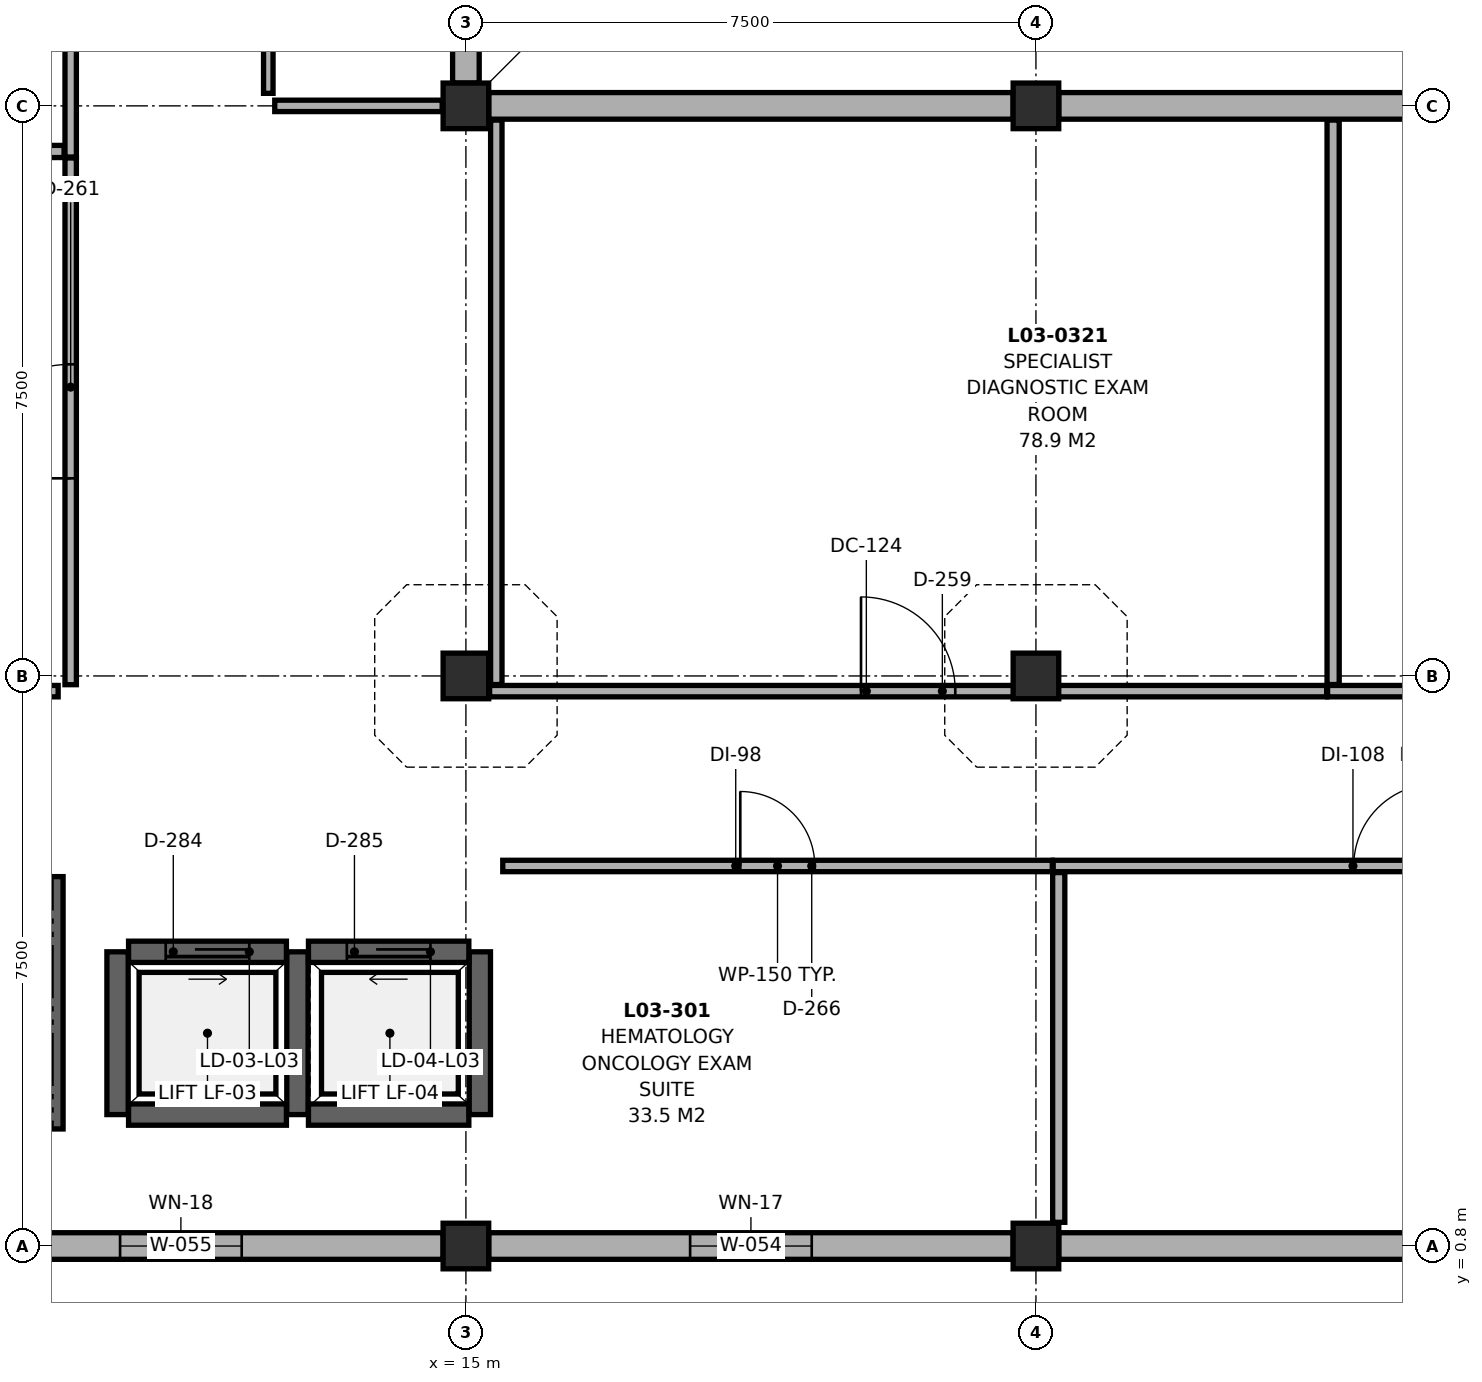
"""IFC4 building model, lengths in metres.
Left out: names, types, materials, properties, quantities, classifications, styles, units other than length and angle.
Written with IfcOpenShell. Run it as: python <this file> out.ifc"""

import sys

from ifc_helpers import new_model, si_unit, direction, frame, frame_2d, origin, origin_2d, place, context, subcontext, project, spatial, rectangle, extrude, element, fill, save


model = new_model("IFC4")
c1 = context("Model", 3, precision=1e-05, world=origin(), true_north=direction((0.0, 1.0)))
c2 = subcontext(c1, "Body", "Model", "MODEL_VIEW")
j1 = project(units=[si_unit("LENGTHUNIT", "METRE"), si_unit("PLANEANGLEUNIT", "RADIAN")], contexts=[c1])
p1 = place(None, origin())
s1 = spatial("IfcSite", under=j1, at=p1, CompositionType="ELEMENT")
p2 = place(p1, origin())
s2 = spatial("IfcBuilding", under=s1, at=p2, CompositionType="ELEMENT")
p3 = place(p2, frame((0.0, 0.0, 13.5)))
s3 = spatial("IfcBuildingStorey", under=s2, at=p3, CompositionType="ELEMENT", Elevation=13.5)
for number, where, z_axis, x_axis in (
    (1, (15.0, 0.8, 0.0), (0.0, 0.0, 1.0), (1.0, 0.0, 0.0)),
    (2, (15.0, 8.3, 0.0), (0.0, 0.0, 1.0), (1.0, 0.0, 0.0)),
    (3, (15.0, 15.8, 0.0), (0.0, 0.0, 1.0), (1.0, 0.0, 0.0)),
    (4, (22.5, 0.8, 0.0), (0.0, 0.0, 1.0), (1.0, 0.0, 0.0)),
    (5, (22.5, 8.3, 0.0), (0.0, 0.0, 1.0), (1.0, 0.0, 0.0)),
    (6, (22.5, 15.8, 0.0), (0.0, 0.0, 1.0), (1.0, 0.0, 0.0)),
):
    element("IfcColumn", number, at=place(p3, frame(where, z_axis=z_axis, x_axis=x_axis)), inside=s3, PredefinedType="COLUMN", context=c2, shape_type="SweptSolid", body=[
        extrude(rectangle(XDim=0.6, YDim=0.6, at=origin_2d()), origin(), (0.0, 0.0, 1.0), 3.72),
    ])
p4 = place(p3, frame((29.7, 0.8, 0.0), z_axis=(0.0, 0.0, 1.0), x_axis=(-1.0, 0.0, 0.0)))
e7 = element("IfcWall", 7, at=p4, inside=s3, PredefinedType="SOLIDWALL", context=c2, shape_type="SweptSolid", body=[
    extrude(rectangle(XDim=6.9, YDim=0.35, at=frame_2d((3.45, 0.0))), origin(), (0.0, 0.0, 1.0), 2.805),
])
p5 = place(p3, frame((22.2, 0.8, 0.0), z_axis=(0.0, 0.0, 1.0), x_axis=(-1.0, 0.0, 0.0)))
e8 = element("IfcWall", 8, at=p5, inside=s3, PredefinedType="SOLIDWALL", context=c2, shape_type="SweptSolid", body=[
    extrude(rectangle(XDim=6.9, YDim=0.35, at=frame_2d((3.45, 0.0))), origin(), (0.0, 0.0, 1.0), 2.805),
])
p6 = place(p5, frame((2.65, 0.0, 0.9)))
e9 = element("IfcOpeningElement", 9, at=p6, cuts=e8, PredefinedType="OPENING", context=c2, shape_type="SweptSolid", body=[
    extrude(rectangle(XDim=1.6, YDim=1.3, at=frame_2d((0.8, 0.65))), frame((0.0, 0.187, 0.0), z_axis=(0.0, -1.0, 0.0), x_axis=(1.0, 0.0, 0.0)), (0.0, 0.0, 1.0), 0.374),
])
p7 = place(p3, frame((14.7, 0.8, 0.0), z_axis=(0.0, 0.0, 1.0), x_axis=(-1.0, 0.0, 0.0)))
e10 = element("IfcWall", 10, at=p7, inside=s3, PredefinedType="SOLIDWALL", context=c2, shape_type="SweptSolid", body=[
    extrude(rectangle(XDim=6.9, YDim=0.35, at=frame_2d((3.45, 0.0))), origin(), (0.0, 0.0, 1.0), 3.055),
])
p8 = place(p7, frame((2.65, 0.0, 0.9)))
e11 = element("IfcOpeningElement", 11, at=p8, cuts=e10, PredefinedType="OPENING", context=c2, shape_type="SweptSolid", body=[
    extrude(rectangle(XDim=1.6, YDim=1.5, at=frame_2d((0.8, 0.75))), frame((0.0, 0.187, 0.0), z_axis=(0.0, -1.0, 0.0), x_axis=(1.0, 0.0, 0.0)), (0.0, 0.0, 1.0), 0.374),
])
for number, where, z_axis, x_axis in (
    (12, (15.3, 15.8, 0.0), (0.0, 0.0, 1.0), (1.0, 0.0, 0.0)),
    (13, (22.8, 15.8, 0.0), (0.0, 0.0, 1.0), (1.0, 0.0, 0.0)),
    (14, (15.0, 23.0, 0.0), (0.0, 0.0, 1.0), (0.0, -1.0, 0.0)),
):
    element("IfcWall", number, at=place(p3, frame(where, z_axis=z_axis, x_axis=x_axis)), inside=s3, PredefinedType="SOLIDWALL", context=c2, shape_type="SweptSolid", body=[
        extrude(rectangle(XDim=6.9, YDim=0.35, at=frame_2d((3.45, 0.0))), origin(), (0.0, 0.0, 1.0), 2.805),
    ])
p9 = place(p3, frame((9.56, 2.34, 0.0), z_axis=(0.0, 0.0, 1.0), x_axis=(0.0, 1.0, 0.0)))
e15 = element("IfcWall", 15, at=p9, inside=s3, PredefinedType="SHEAR", context=c2, shape_type="SweptSolid", body=[
    extrude(rectangle(XDim=3.32, YDim=0.28, at=frame_2d((1.66, 0.0))), origin(), (0.0, 0.0, 1.0), 3.72),
])
p10 = place(p3, frame((10.562, 2.529, 0.0), z_axis=(0.0, 0.0, 1.0), x_axis=(1.0, 0.0, 0.0)))
e16 = element("IfcWall", 16, at=p10, inside=s3, PredefinedType="SHEAR", context=c2, shape_type="SweptSolid", body=[
    extrude(rectangle(XDim=2.077, YDim=0.28, at=frame_2d((1.039, 0.0))), origin(), (0.0, 0.0, 1.0), 3.72),
])
p11 = place(p3, frame((12.783, 2.529, 0.0), z_axis=(0.0, 0.0, 1.0), x_axis=(0.0, 1.0, 0.0)))
e17 = element("IfcWall", 17, at=p11, inside=s3, PredefinedType="SHEAR", context=c2, shape_type="SweptSolid", body=[
    extrude(rectangle(XDim=2.141, YDim=0.28, at=frame_2d((1.071, 0.0))), origin(), (0.0, 0.0, 1.0), 3.72),
])
p12 = place(p3, frame((12.638, 4.671, 0.0), z_axis=(0.0, 0.0, 1.0), x_axis=(-1.0, 0.0, 0.0)))
e18 = element("IfcWall", 18, at=p12, inside=s3, PredefinedType="SHEAR", context=c2, shape_type="SweptSolid", body=[
    extrude(rectangle(XDim=2.077, YDim=0.28, at=frame_2d((1.039, 0.0))), origin(), (0.0, 0.0, 1.0), 3.72),
])
p13 = place(p12, frame((0.489, 0.0, 0.0)))
e19 = element("IfcOpeningElement", 19, at=p13, cuts=e18, PredefinedType="OPENING", context=c2, shape_type="SweptSolid", body=[
    extrude(rectangle(XDim=1.1, YDim=2.15, at=frame_2d((0.55, 1.075))), frame((0.0, 0.152, 0.0), z_axis=(0.0, -1.0, 0.0), x_axis=(1.0, 0.0, 0.0)), (0.0, 0.0, 1.0), 0.304),
])
p14 = place(p3, frame((10.417, 4.671, 0.0), z_axis=(0.0, 0.0, 1.0), x_axis=(0.0, -1.0, 0.0)))
e20 = element("IfcWall", 20, at=p14, inside=s3, PredefinedType="SHEAR", context=c2, shape_type="SweptSolid", body=[
    extrude(rectangle(XDim=2.141, YDim=0.28, at=frame_2d((1.071, 0.0))), origin(), (0.0, 0.0, 1.0), 3.72),
])
p15 = place(p3, frame((12.928, 2.529, 0.0), z_axis=(0.0, 0.0, 1.0), x_axis=(1.0, 0.0, 0.0)))
e21 = element("IfcWall", 21, at=p15, inside=s3, PredefinedType="SHEAR", context=c2, shape_type="SweptSolid", body=[
    extrude(rectangle(XDim=2.11, YDim=0.28, at=frame_2d((1.055, 0.0))), origin(), (0.0, 0.0, 1.0), 3.72),
])
p16 = place(p3, frame((15.184, 2.529, 0.0), z_axis=(0.0, 0.0, 1.0), x_axis=(0.0, 1.0, 0.0)))
e22 = element("IfcWall", 22, at=p16, inside=s3, PredefinedType="SHEAR", context=c2, shape_type="SweptSolid", body=[
    extrude(rectangle(XDim=2.141, YDim=0.28, at=frame_2d((1.071, 0.0))), origin(), (0.0, 0.0, 1.0), 3.72),
])
p17 = place(p3, frame((15.039, 4.671, 0.0), z_axis=(0.0, 0.0, 1.0), x_axis=(-1.0, 0.0, 0.0)))
e23 = element("IfcWall", 23, at=p17, inside=s3, PredefinedType="SHEAR", context=c2, shape_type="SweptSolid", body=[
    extrude(rectangle(XDim=2.11, YDim=0.28, at=frame_2d((1.055, 0.0))), origin(), (0.0, 0.0, 1.0), 3.72),
])
p18 = place(p17, frame((0.505, 0.0, 0.0)))
e24 = element("IfcOpeningElement", 24, at=p18, cuts=e23, PredefinedType="OPENING", context=c2, shape_type="SweptSolid", body=[
    extrude(rectangle(XDim=1.1, YDim=2.15, at=frame_2d((0.55, 1.075))), frame((0.0, 0.152, 0.0), z_axis=(0.0, -1.0, 0.0), x_axis=(1.0, 0.0, 0.0)), (0.0, 0.0, 1.0), 0.304),
])
p19 = place(p3, frame((15.485, 5.8, 0.0), z_axis=(0.0, 0.0, 1.0), x_axis=(1.0, 0.0, 0.0)))
e25 = element("IfcWall", 25, at=p19, inside=s3, PredefinedType="PARTITIONING", context=c2, shape_type="SweptSolid", body=[
    extrude(rectangle(XDim=7.23, YDim=0.15, at=frame_2d((3.615, 0.0))), origin(), (0.0, 0.0, 1.0), 2.805),
])
p20 = place(p19, frame((3.125, 0.0, 0.0)))
e26 = element("IfcOpeningElement", 26, at=p20, cuts=e25, PredefinedType="OPENING", context=c2, shape_type="SweptSolid", body=[
    extrude(rectangle(XDim=0.98, YDim=2.12, at=frame_2d((0.49, 1.06))), frame((0.0, 0.087, 0.0), z_axis=(0.0, -1.0, 0.0), x_axis=(1.0, 0.0, 0.0)), (0.0, 0.0, 1.0), 0.174),
])
p21 = place(p3, frame((22.727, 5.8, 0.0), z_axis=(0.0, 0.0, 1.0), x_axis=(1.0, 0.0, 0.0)))
e27 = element("IfcWall", 27, at=p21, inside=s3, PredefinedType="PARTITIONING", context=c2, shape_type="SweptSolid", body=[
    extrude(rectangle(XDim=8.988, YDim=0.15, at=frame_2d((4.494, 0.0))), origin(), (0.0, 0.0, 1.0), 2.805),
])
p22 = place(p21, frame((3.954, 0.0, 0.0)))
e28 = element("IfcOpeningElement", 28, at=p22, cuts=e27, PredefinedType="OPENING", context=c2, shape_type="SweptSolid", body=[
    extrude(rectangle(XDim=1.08, YDim=2.18, at=frame_2d((0.54, 1.09))), frame((0.0, 0.087, 0.0), z_axis=(0.0, -1.0, 0.0), x_axis=(1.0, 0.0, 0.0)), (0.0, 0.0, 1.0), 0.174),
])
p23 = place(p3, frame((15.312, 8.1, 0.0), z_axis=(0.0, 0.0, 1.0), x_axis=(1.0, 0.0, 0.0)))
e29 = element("IfcWall", 29, at=p23, inside=s3, PredefinedType="PARTITIONING", context=c2, shape_type="SweptSolid", body=[
    extrude(rectangle(XDim=11.013, YDim=0.15, at=frame_2d((5.506, 0.0))), origin(), (0.0, 0.0, 1.0), 2.805),
])
p24 = place(p23, frame((4.886, 0.0, 0.0)))
e30 = element("IfcOpeningElement", 30, at=p24, cuts=e29, PredefinedType="OPENING", context=c2, shape_type="SweptSolid", body=[
    extrude(rectangle(XDim=1.24, YDim=2.2, at=frame_2d((0.62, 1.1))), frame((0.0, 0.087, 0.0), z_axis=(0.0, -1.0, 0.0), x_axis=(1.0, 0.0, 0.0)), (0.0, 0.0, 1.0), 0.174),
])
p25 = place(p3, frame((26.337, 8.1, 0.0), z_axis=(0.0, 0.0, 1.0), x_axis=(1.0, 0.0, 0.0)))
e31 = element("IfcWall", 31, at=p25, inside=s3, PredefinedType="PARTITIONING", context=c2, shape_type="SweptSolid", body=[
    extrude(rectangle(XDim=10.876, YDim=0.15, at=frame_2d((5.438, 0.0))), origin(), (0.0, 0.0, 1.0), 2.805),
])
p26 = place(p25, frame((4.798, 0.0, 0.0)))
e32 = element("IfcOpeningElement", 32, at=p26, cuts=e31, PredefinedType="OPENING", context=c2, shape_type="SweptSolid", body=[
    extrude(rectangle(XDim=1.28, YDim=2.22, at=frame_2d((0.64, 1.11))), frame((0.0, 0.087, 0.0), z_axis=(0.0, -1.0, 0.0), x_axis=(1.0, 0.0, 0.0)), (0.0, 0.0, 1.0), 0.174),
])
p27 = place(p3, frame((9.8, 8.185, 0.0), z_axis=(0.0, 0.0, 1.0), x_axis=(0.0, 1.0, 0.0)))
e33 = element("IfcWall", 33, at=p27, inside=s3, PredefinedType="PARTITIONING", context=c2, shape_type="SweptSolid", body=[
    extrude(rectangle(XDim=6.93, YDim=0.15, at=frame_2d((3.465, 0.0))), origin(), (0.0, 0.0, 1.0), 2.805),
])
p28 = place(p27, frame((2.715, 0.0, 0.0)))
e34 = element("IfcOpeningElement", 34, at=p28, cuts=e33, PredefinedType="OPENING", context=c2, shape_type="SweptSolid", body=[
    extrude(rectangle(XDim=1.5, YDim=2.28, at=frame_2d((0.75, 1.14))), frame((0.0, 0.087, 0.0), z_axis=(0.0, -1.0, 0.0), x_axis=(1.0, 0.0, 0.0)), (0.0, 0.0, 1.0), 0.174),
])
p29 = place(p3, frame((9.8, 15.127, 0.0), z_axis=(0.0, 0.0, 1.0), x_axis=(0.0, 1.0, 0.0)))
e35 = element("IfcWall", 35, at=p29, inside=s3, PredefinedType="PARTITIONING", context=c2, shape_type="SweptSolid", body=[
    extrude(rectangle(XDim=7.188, YDim=0.15, at=frame_2d((3.594, 0.0))), origin(), (0.0, 0.0, 1.0), 2.805),
])
p30 = place(p29, frame((2.814, 0.0, 0.0)))
e36 = element("IfcOpeningElement", 36, at=p30, cuts=e35, PredefinedType="OPENING", context=c2, shape_type="SweptSolid", body=[
    extrude(rectangle(XDim=1.56, YDim=2.3, at=frame_2d((0.78, 1.15))), frame((0.0, 0.087, 0.0), z_axis=(0.0, -1.0, 0.0), x_axis=(1.0, 0.0, 0.0)), (0.0, 0.0, 1.0), 0.174),
])
p31 = place(p3, frame((12.485, 15.8, 0.0), z_axis=(0.0, 0.0, 1.0), x_axis=(1.0, 0.0, 0.0)))
e37 = element("IfcWall", 37, at=p31, inside=s3, PredefinedType="PARTITIONING", context=c2, shape_type="SweptSolid", body=[
    extrude(rectangle(XDim=2.203, YDim=0.15, at=frame_2d((1.102, 0.0))), origin(), (0.0, 0.0, 1.0), 2.805),
])
p32 = place(p3, frame((22.8, 1.112, 0.0), z_axis=(0.0, 0.0, 1.0), x_axis=(0.0, 1.0, 0.0)))
e38 = element("IfcWall", 38, at=p32, inside=s3, PredefinedType="PARTITIONING", context=c2, shape_type="SweptSolid", body=[
    extrude(rectangle(XDim=4.601, YDim=0.16, at=frame_2d((2.3, 0.0))), origin(), (0.0, 0.0, 1.0), 2.805),
])
p33 = place(p3, frame((15.4, 8.187, 0.0), z_axis=(0.0, 0.0, 1.0), x_axis=(0.0, 1.0, 0.0)))
e39 = element("IfcWall", 39, at=p33, inside=s3, PredefinedType="PARTITIONING", context=c2, shape_type="SweptSolid", body=[
    extrude(rectangle(XDim=7.426, YDim=0.15, at=frame_2d((3.713, 0.0))), origin(), (0.0, 0.0, 1.0), 2.805),
])
p34 = place(p3, frame((26.41, 8.187, 0.0), z_axis=(0.0, 0.0, 1.0), x_axis=(0.0, 1.0, 0.0)))
e40 = element("IfcWall", 40, at=p34, inside=s3, PredefinedType="PARTITIONING", context=c2, shape_type="SweptSolid", body=[
    extrude(rectangle(XDim=7.426, YDim=0.16, at=frame_2d((3.713, 0.0))), origin(), (0.0, 0.0, 1.0), 2.805),
])
p35 = place(p3, frame((0.312, 8.1, 0.0), z_axis=(0.0, 0.0, 1.0), x_axis=(1.0, 0.0, 0.0)))
e41 = element("IfcWall", 41, at=p35, inside=s3, PredefinedType="PARTITIONING", context=c2, shape_type="SweptSolid", body=[
    extrude(rectangle(XDim=9.323, YDim=0.15, at=frame_2d((4.662, 0.0))), origin(), (0.0, 0.0, 1.0), 2.805),
])
p36 = place(p3, frame((0.187, 15.2, 0.0), z_axis=(0.0, 0.0, 1.0), x_axis=(1.0, 0.0, 0.0)))
e42 = element("IfcWall", 42, at=p36, inside=s3, PredefinedType="PARTITIONING", context=c2, shape_type="SweptSolid", body=[
    extrude(rectangle(XDim=9.526, YDim=0.16, at=frame_2d((4.763, 0.0))), origin(), (0.0, 0.0, 1.0), 2.805),
])
p37 = place(p3, frame((12.4, 15.965, 0.0), z_axis=(0.0, 0.0, 1.0), x_axis=(0.0, 1.0, 0.0)))
e43 = element("IfcWall", 43, at=p37, inside=s3, PredefinedType="PARTITIONING", context=c2, shape_type="SweptSolid", body=[
    extrude(rectangle(XDim=17.07, YDim=0.125, at=frame_2d((8.535, 0.0))), origin(), (0.0, 0.0, 1.0), 2.805),
])
p38 = place(p6, origin())
e44 = element("IfcWindow", 44, at=p38, inside=s3, PartitioningType="DOUBLE_PANEL_VERTICAL", PredefinedType="WINDOW", context=c2, shape_type="SweptSolid", body=[
    extrude(rectangle(XDim=1.6, YDim=1.3, at=frame_2d((0.8, 0.65))), frame((0.0, 0.03, 0.0), z_axis=(0.0, -1.0, 0.0), x_axis=(1.0, 0.0, 0.0)), (0.0, 0.0, 1.0), 0.06),
])
fill(e9, e44)
p39 = place(p8, origin())
e45 = element("IfcWindow", 45, at=p39, inside=s3, PartitioningType="DOUBLE_PANEL_VERTICAL", PredefinedType="WINDOW", context=c2, shape_type="SweptSolid", body=[
    extrude(rectangle(XDim=1.6, YDim=1.5, at=frame_2d((0.8, 0.75))), frame((0.0, 0.03, 0.0), z_axis=(0.0, -1.0, 0.0), x_axis=(1.0, 0.0, 0.0)), (0.0, 0.0, 1.0), 0.06),
])
fill(e11, e45)
p40 = place(p13, origin())
e46 = element("IfcDoor", 46, at=p40, inside=s3, OperationType="SLIDING_TO_LEFT", PredefinedType="DOOR", context=c2, shape_type="SweptSolid", body=[
    extrude(rectangle(XDim=1.1, YDim=2.15, at=frame_2d((0.55, 1.075))), frame((0.0, 0.025, 0.0), z_axis=(0.0, -1.0, 0.0), x_axis=(1.0, 0.0, 0.0)), (0.0, 0.0, 1.0), 0.05),
])
fill(e19, e46)
p41 = place(p18, origin())
e47 = element("IfcDoor", 47, at=p41, inside=s3, OperationType="SLIDING_TO_RIGHT", PredefinedType="DOOR", context=c2, shape_type="SweptSolid", body=[
    extrude(rectangle(XDim=1.1, YDim=2.15, at=frame_2d((0.55, 1.075))), frame((0.0, 0.025, 0.0), z_axis=(0.0, -1.0, 0.0), x_axis=(1.0, 0.0, 0.0)), (0.0, 0.0, 1.0), 0.05),
])
fill(e24, e47)
p42 = place(p20, origin())
e48 = element("IfcDoor", 48, at=p42, inside=s3, OperationType="SINGLE_SWING_LEFT", PredefinedType="DOOR", context=c2, shape_type="SweptSolid", body=[
    extrude(rectangle(XDim=0.98, YDim=2.12, at=frame_2d((0.49, 1.06))), frame((0.0, 0.025, 0.0), z_axis=(0.0, -1.0, 0.0), x_axis=(1.0, 0.0, 0.0)), (0.0, 0.0, 1.0), 0.05),
])
fill(e26, e48)
p43 = place(p22, origin())
e49 = element("IfcDoor", 49, at=p43, inside=s3, OperationType="SINGLE_SWING_RIGHT", PredefinedType="DOOR", context=c2, shape_type="SweptSolid", body=[
    extrude(rectangle(XDim=1.08, YDim=2.18, at=frame_2d((0.54, 1.09))), frame((0.0, 0.025, 0.0), z_axis=(0.0, -1.0, 0.0), x_axis=(1.0, 0.0, 0.0)), (0.0, 0.0, 1.0), 0.05),
])
fill(e28, e49)
p44 = place(p24, origin())
e50 = element("IfcDoor", 50, at=p44, inside=s3, OperationType="SINGLE_SWING_LEFT", PredefinedType="DOOR", context=c2, shape_type="SweptSolid", body=[
    extrude(rectangle(XDim=1.24, YDim=2.2, at=frame_2d((0.62, 1.1))), frame((0.0, 0.025, 0.0), z_axis=(0.0, -1.0, 0.0), x_axis=(1.0, 0.0, 0.0)), (0.0, 0.0, 1.0), 0.05),
])
fill(e30, e50)
p45 = place(p28, origin())
e51 = element("IfcDoor", 51, at=p45, inside=s3, OperationType="SINGLE_SWING_LEFT", PredefinedType="DOOR", context=c2, shape_type="SweptSolid", body=[
    extrude(rectangle(XDim=1.5, YDim=2.28, at=frame_2d((0.75, 1.14))), frame((0.0, 0.025, 0.0), z_axis=(0.0, -1.0, 0.0), x_axis=(1.0, 0.0, 0.0)), (0.0, 0.0, 1.0), 0.05),
])
fill(e34, e51)
save(model, sys.argv[1])
